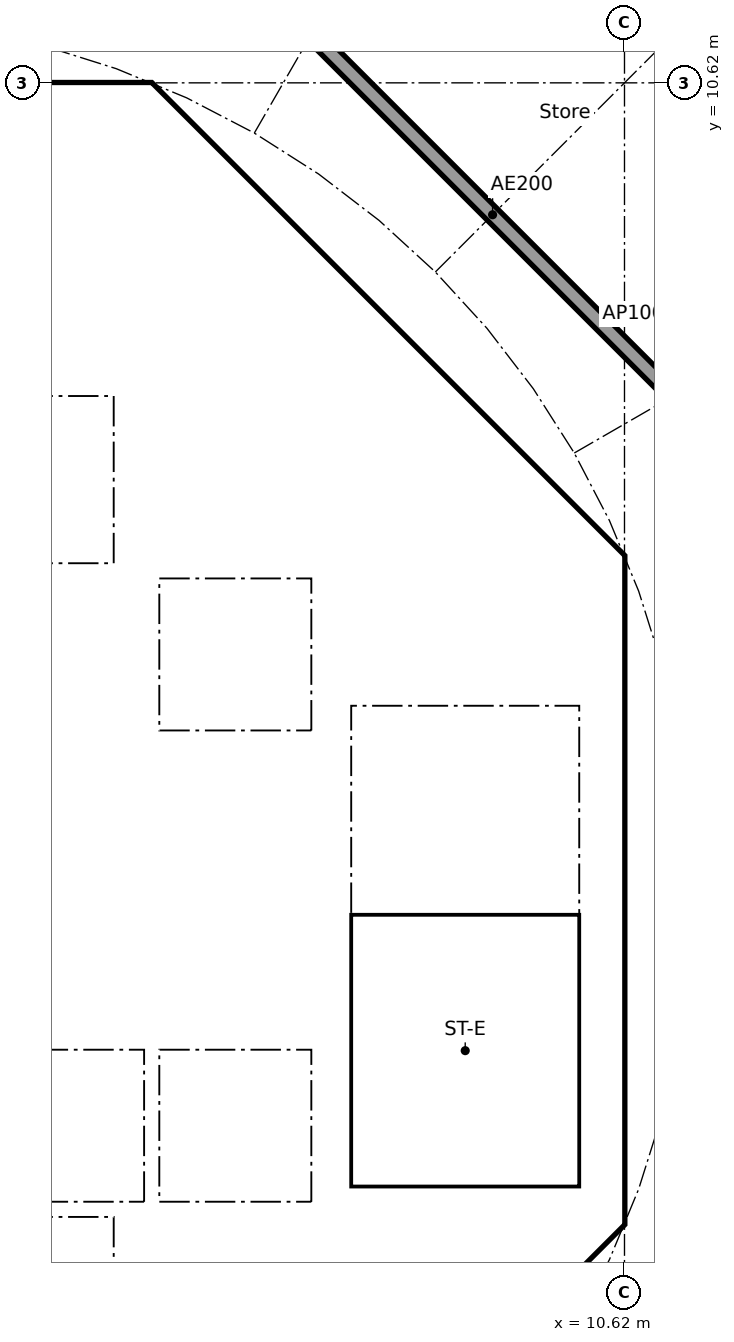
"""IFC4 building model, lengths in metres.
Left out: names, types, materials, properties, quantities, classifications, styles, units other than length and angle.
Written with IfcOpenShell. Run it as: python <this file> out.ifc"""

import sys

from ifc_helpers import new_model, si_unit, direction, frame, frame_2d, origin, place, context, subcontext, project, spatial, polyline, rectangle, outline, extrude, element, fill, save


model = new_model("IFC4")
c1 = context("Model", 3, precision=1e-05, world=origin(), true_north=direction((0.0, 1.0)))
c2 = subcontext(c1, "Body", "Model", "MODEL_VIEW")
j1 = project(units=[si_unit("LENGTHUNIT", "METRE"), si_unit("PLANEANGLEUNIT", "RADIAN")], contexts=[c1])
p1 = place(None, origin())
s1 = spatial("IfcSite", under=j1, at=p1, CompositionType="ELEMENT")
p2 = place(p1, origin())
s2 = spatial("IfcBuilding", under=s1, at=p2, CompositionType="ELEMENT")
p3 = place(p2, frame((0.0, 0.0, 262.2)))
s3 = spatial("IfcBuildingStorey", under=s2, at=p3, CompositionType="ELEMENT", Elevation=262.2)
p4 = place(p3, frame((9.988, 4.613, 0.0), z_axis=(0.0, 0.0, 1.0), x_axis=(-0.707106781187, 0.707106781187, 0.0)))
e1 = element("IfcWall", 1, at=p4, inside=s3, PredefinedType="SHEAR", context=c2, shape_type="SweptSolid", body=[
    extrude(rectangle(XDim=7.602, YDim=0.6, at=frame_2d((3.801, 0.0))), origin(), (0.0, 0.0, 1.0), 3.44),
])
p5 = place(p4, frame((3.201, 0.0, 0.0)))
e2 = element("IfcOpeningElement", 2, at=p5, cuts=e1, PredefinedType="OPENING", context=c2, shape_type="SweptSolid", body=[
    extrude(rectangle(XDim=1.2, YDim=2.1, at=frame_2d((0.6, 1.05))), frame((0.0, 0.31, 0.0), z_axis=(0.0, -1.0, 0.0), x_axis=(1.0, 0.0, 0.0)), (0.0, 0.0, 1.0), 0.62),
])
p6 = place(p3, frame((4.613, -9.988, 0.0), z_axis=(0.0, 0.0, 1.0), x_axis=(0.707106781187, 0.707106781187, 0.0)))
e3 = element("IfcWall", 3, at=p6, inside=s3, PredefinedType="SHEAR", context=c2, shape_type="SweptSolid", body=[
    extrude(rectangle(XDim=7.602, YDim=0.6, at=frame_2d((3.801, 0.0))), origin(), (0.0, 0.0, 1.0), 3.44),
])
p7 = place(p6, frame((3.201, 0.0, 0.0)))
e4 = element("IfcOpeningElement", 4, at=p7, cuts=e3, PredefinedType="OPENING", context=c2, shape_type="SweptSolid", body=[
    extrude(rectangle(XDim=1.2, YDim=2.1, at=frame_2d((0.6, 1.05))), frame((0.0, 0.31, 0.0), z_axis=(0.0, -1.0, 0.0), x_axis=(1.0, 0.0, 0.0)), (0.0, 0.0, 1.0), 0.62),
])
p8 = place(p3, frame((4.0, 4.3, 0.0), z_axis=(0.0, 0.0, 1.0), x_axis=(0.0, 1.0, 0.0)))
e5 = element("IfcWall", 5, at=p8, inside=s3, PredefinedType="SOLIDWALL", context=c2, shape_type="SweptSolid", body=[
    extrude(rectangle(XDim=2.2, YDim=0.2, at=frame_2d((1.1, 0.0))), origin(), (0.0, 0.0, 1.0), 3.44),
])
p9 = place(p8, frame((0.55, 0.0, 0.0)))
e6 = element("IfcOpeningElement", 6, at=p9, cuts=e5, PredefinedType="OPENING", context=c2, shape_type="SweptSolid", body=[
    extrude(rectangle(XDim=1.1, YDim=2.1, at=frame_2d((0.55, 1.05))), frame((0.0, 0.11, 0.0), z_axis=(0.0, -1.0, 0.0), x_axis=(1.0, 0.0, 0.0)), (0.0, 0.0, 1.0), 0.22),
])
p10 = place(p3, frame((-6.7, 2.0, 0.0), z_axis=(0.0, 0.0, 1.0), x_axis=(1.0, 0.0, 0.0)))
e7 = element("IfcWall", 7, at=p10, inside=s3, PredefinedType="SOLIDWALL", context=c2, shape_type="SweptSolid", body=[
    extrude(rectangle(XDim=13.4, YDim=0.2, at=frame_2d((6.7, 0.0))), origin(), (0.0, 0.0, 1.0), 3.44),
])
p11 = place(p10, frame((11.65, 0.0, 0.0)))
e8 = element("IfcOpeningElement", 8, at=p11, cuts=e7, PredefinedType="OPENING", context=c2, shape_type="SweptSolid", body=[
    extrude(rectangle(XDim=1.1, YDim=2.1, at=frame_2d((0.55, 1.05))), frame((0.0, 0.11, 0.0), z_axis=(0.0, -1.0, 0.0), x_axis=(1.0, 0.0, 0.0)), (0.0, 0.0, 1.0), 0.22),
])
p12 = place(p10, frame((2.95, 0.0, 0.0)))
e9 = element("IfcOpeningElement", 9, at=p12, cuts=e7, PredefinedType="OPENING", context=c2, shape_type="SweptSolid", body=[
    extrude(rectangle(XDim=0.9, YDim=2.1, at=frame_2d((0.45, 1.05))), frame((0.0, 0.11, 0.0), z_axis=(0.0, -1.0, 0.0), x_axis=(1.0, 0.0, 0.0)), (0.0, 0.0, 1.0), 0.22),
])
p13 = place(p10, frame((8.45, 0.0, 0.0)))
e10 = element("IfcOpeningElement", 10, at=p13, cuts=e7, PredefinedType="OPENING", context=c2, shape_type="SweptSolid", body=[
    extrude(rectangle(XDim=0.9, YDim=2.1, at=frame_2d((0.45, 1.05))), frame((0.0, 0.11, 0.0), z_axis=(0.0, -1.0, 0.0), x_axis=(1.0, 0.0, 0.0)), (0.0, 0.0, 1.0), 0.22),
])
p14 = place(p3, frame((6.7, 4.0, 0.0), z_axis=(0.0, 0.0, 1.0), x_axis=(1.0, 0.0, 0.0)))
e11 = element("IfcWall", 11, at=p14, inside=s3, PredefinedType="SOLIDWALL", context=c2, shape_type="SweptSolid", body=[
    extrude(rectangle(XDim=3.325, YDim=0.2, at=frame_2d((1.662, 0.0))), origin(), (0.0, 0.0, 1.0), 3.44),
])
p15 = place(p14, frame((1.25, 0.0, 0.0)))
e12 = element("IfcOpeningElement", 12, at=p15, cuts=e11, PredefinedType="OPENING", context=c2, shape_type="SweptSolid", body=[
    extrude(rectangle(XDim=1.1, YDim=2.1, at=frame_2d((0.55, 1.05))), frame((0.0, 0.11, 0.0), z_axis=(0.0, -1.0, 0.0), x_axis=(1.0, 0.0, 0.0)), (0.0, 0.0, 1.0), 0.22),
])
p16 = place(p3, frame((4.0, 7.025, 0.0), z_axis=(0.0, 0.0, 1.0), x_axis=(0.0, 1.0, 0.0)))
e13 = element("IfcWall", 13, at=p16, inside=s3, PredefinedType="SOLIDWALL", context=c2, shape_type="SweptSolid", body=[
    extrude(rectangle(XDim=3.0, YDim=0.2, at=frame_2d((1.5, 0.0))), origin(), (0.0, 0.0, 1.0), 3.44),
])
p17 = place(p16, frame((0.925, 0.0, 0.0)))
e14 = element("IfcOpeningElement", 14, at=p17, cuts=e13, PredefinedType="OPENING", context=c2, shape_type="SweptSolid", body=[
    extrude(rectangle(XDim=1.1, YDim=2.1, at=frame_2d((0.55, 1.05))), frame((0.0, 0.11, 0.0), z_axis=(0.0, -1.0, 0.0), x_axis=(1.0, 0.0, 0.0)), (0.0, 0.0, 1.0), 0.22),
])
p18 = place(p3, frame((4.0, -6.5, 0.0), z_axis=(0.0, 0.0, 1.0), x_axis=(0.0, 1.0, 0.0)))
e15 = element("IfcWall", 15, at=p18, inside=s3, PredefinedType="SOLIDWALL", context=c2, shape_type="SweptSolid", body=[
    extrude(rectangle(XDim=2.2, YDim=0.2, at=frame_2d((1.1, 0.0))), origin(), (0.0, 0.0, 1.0), 3.44),
])
p19 = place(p18, frame((0.55, 0.0, 0.0)))
e16 = element("IfcOpeningElement", 16, at=p19, cuts=e15, PredefinedType="OPENING", context=c2, shape_type="SweptSolid", body=[
    extrude(rectangle(XDim=1.1, YDim=2.1, at=frame_2d((0.55, 1.05))), frame((0.0, 0.11, 0.0), z_axis=(0.0, -1.0, 0.0), x_axis=(1.0, 0.0, 0.0)), (0.0, 0.0, 1.0), 0.22),
])
p20 = place(p3, frame((-6.7, -2.0, 0.0), z_axis=(0.0, 0.0, 1.0), x_axis=(1.0, 0.0, 0.0)))
e17 = element("IfcWall", 17, at=p20, inside=s3, PredefinedType="SOLIDWALL", context=c2, shape_type="SweptSolid", body=[
    extrude(rectangle(XDim=13.4, YDim=0.2, at=frame_2d((6.7, 0.0))), origin(), (0.0, 0.0, 1.0), 3.44),
])
p21 = place(p20, frame((9.45, 0.0, 0.0)))
e18 = element("IfcOpeningElement", 18, at=p21, cuts=e17, PredefinedType="OPENING", context=c2, shape_type="SweptSolid", body=[
    extrude(rectangle(XDim=1.1, YDim=2.1, at=frame_2d((0.55, 1.05))), frame((0.0, 0.11, 0.0), z_axis=(0.0, -1.0, 0.0), x_axis=(1.0, 0.0, 0.0)), (0.0, 0.0, 1.0), 0.22),
])
p22 = place(p20, frame((11.65, 0.0, 0.0)))
e19 = element("IfcOpeningElement", 19, at=p22, cuts=e17, PredefinedType="OPENING", context=c2, shape_type="SweptSolid", body=[
    extrude(rectangle(XDim=1.1, YDim=2.1, at=frame_2d((0.55, 1.05))), frame((0.0, 0.11, 0.0), z_axis=(0.0, -1.0, 0.0), x_axis=(1.0, 0.0, 0.0)), (0.0, 0.0, 1.0), 0.22),
])
p23 = place(p20, frame((1.85, 0.0, 0.0)))
e20 = element("IfcOpeningElement", 20, at=p23, cuts=e17, PredefinedType="OPENING", context=c2, shape_type="SweptSolid", body=[
    extrude(rectangle(XDim=0.9, YDim=2.1, at=frame_2d((0.45, 1.05))), frame((0.0, 0.11, 0.0), z_axis=(0.0, -1.0, 0.0), x_axis=(1.0, 0.0, 0.0)), (0.0, 0.0, 1.0), 0.22),
])
p24 = place(p20, frame((6.25, 0.0, 0.0)))
e21 = element("IfcOpeningElement", 21, at=p24, cuts=e17, PredefinedType="OPENING", context=c2, shape_type="SweptSolid", body=[
    extrude(rectangle(XDim=0.9, YDim=2.1, at=frame_2d((0.45, 1.05))), frame((0.0, 0.11, 0.0), z_axis=(0.0, -1.0, 0.0), x_axis=(1.0, 0.0, 0.0)), (0.0, 0.0, 1.0), 0.22),
])
p25 = place(p3, origin())
e22 = element("IfcWall", 22, at=p25, inside=s3, PredefinedType="SHEAR", context=c2, shape_type="SweptSolid", body=[
    extrude(outline(polyline([(-4.152, 10.025), (-4.401, 9.776), (-4.825, 10.2), (-4.401, 10.625), (4.401, 10.625), (4.825, 10.2), (4.401, 9.776), (4.152, 10.025), (-4.152, 10.025)])), origin(), (0.0, 0.0, 1.0), 3.44),
])
p26 = place(p3, origin())
e23 = element("IfcWall", 23, at=p26, inside=s3, PredefinedType="SHEAR", context=c2, shape_type="SweptSolid", body=[
    extrude(outline(polyline([(9.776, -4.401), (10.025, -4.152), (10.025, -3.801), (10.025, 4.152), (9.776, 4.401), (10.2, 4.825), (10.625, 4.401), (10.625, -4.401), (10.2, -4.825), (9.776, -4.401)])), origin(), (0.0, 0.0, 1.0), 3.44),
])
p27 = place(p3, origin())
e24 = element("IfcWall", 24, at=p27, inside=s3, PredefinedType="SOLIDWALL", context=c2, shape_type="SweptSolid", body=[
    extrude(outline(polyline([(-6.7, -2.1), (-6.5, -2.1), (-6.5, -4.1), (-2.3, -4.1), (-2.3, -2.1), (-2.1, -2.1), (-2.1, -4.1), (2.1, -4.1), (2.1, -2.1), (2.3, -2.1), (2.3, -4.1), (4.3, -4.1), (4.3, -2.1), (4.5, -2.1), (4.5, -4.1), (6.5, -4.1), (6.5, -2.1), (6.7, -2.1), (6.7, -4.3), (-6.7, -4.3), (-6.7, -2.1)])), origin(), (0.0, 0.0, 1.0), 3.44),
])
p28 = place(p3, origin())
e25 = element("IfcWall", 25, at=p28, inside=s3, PredefinedType="SOLIDWALL", context=c2, shape_type="SweptSolid", body=[
    extrude(outline(polyline([(-6.7, 4.3), (6.7, 4.3), (6.7, 2.1), (6.5, 2.1), (6.5, 4.1), (4.5, 4.1), (4.5, 2.1), (4.3, 2.1), (4.3, 4.1), (0.1, 4.1), (0.1, 2.1), (-0.1, 2.1), (-0.1, 4.1), (-6.5, 4.1), (-6.5, 2.1), (-6.7, 2.1), (-6.7, 4.3)])), origin(), (0.0, 0.0, 1.0), 3.44),
])
p29 = place(p3, origin())
e26 = element("IfcWall", 26, at=p29, inside=s3, PredefinedType="SOLIDWALL", context=c2, shape_type="SweptSolid", body=[
    extrude(outline(polyline([(4.1, 6.5), (-4.1, 6.5), (-4.1, 7.025), (4.1, 7.025), (4.1, 6.5)])), origin(), (0.0, 0.0, 1.0), 3.44),
])
p30 = place(p3, origin())
e27 = element("IfcWall", 27, at=p30, inside=s3, PredefinedType="SOLIDWALL", context=c2, shape_type="SweptSolid", body=[
    extrude(outline(polyline([(7.025, -3.9), (6.7, -3.9), (6.7, 3.9), (7.025, 3.9), (7.025, -3.9)])), origin(), (0.0, 0.0, 1.0), 3.44),
])
p31 = place(p3, origin())
e28 = element("IfcWall", 28, at=p31, inside=s3, PredefinedType="SOLIDWALL", context=c2, shape_type="SweptSolid", body=[
    extrude(outline(polyline([(10.025, -4.1), (6.7, -4.1), (6.7, -3.9), (10.025, -3.9), (10.025, -4.1)])), origin(), (0.0, 0.0, 1.0), 3.44),
])
p32 = place(p3, frame((12.635, 5.134, 0.0), z_axis=(0.0, 0.0, 1.0), x_axis=(-0.707106781187, 0.707106781187, 0.0)))
e29 = element("IfcWall", 29, at=p32, inside=s3, PredefinedType="PARTITIONING", context=c2, shape_type="SweptSolid", body=[
    extrude(rectangle(XDim=10.609, YDim=0.2, at=frame_2d((5.305, 0.0))), origin(), (0.0, 0.0, 1.0), 3.44),
])
p33 = place(p3, frame((15.098, 6.427, 0.0), z_axis=(0.0, 0.0, 1.0), x_axis=(-0.637936555536, 0.770088924158, 0.0)))
e30 = element("IfcWall", 30, at=p33, inside=s3, PredefinedType="PARTITIONING", context=c2, shape_type="SweptSolid", body=[
    extrude(rectangle(XDim=6.46, YDim=0.1, at=frame_2d((3.23, 0.0))), origin(), (0.0, 0.0, 1.0), 2.905),
])
p34 = place(p33, frame((2.78, 0.0, 0.0)))
e31 = element("IfcOpeningElement", 31, at=p34, cuts=e30, PredefinedType="OPENING", context=c2, shape_type="SweptSolid", body=[
    extrude(rectangle(XDim=0.9, YDim=2.1, at=frame_2d((0.45, 1.05))), frame((0.0, 0.06, 0.0), z_axis=(0.0, -1.0, 0.0), x_axis=(1.0, 0.0, 0.0)), (0.0, 0.0, 1.0), 0.12),
])
p35 = place(p11, origin())
e32 = element("IfcDoor", 32, at=p35, inside=s3, OperationType="DOUBLE_DOOR_SLIDING", PredefinedType="DOOR", context=c2, shape_type="SweptSolid", body=[
    extrude(rectangle(XDim=1.1, YDim=2.1, at=frame_2d((0.55, 1.05))), frame((0.0, 0.025, 0.0), z_axis=(0.0, -1.0, 0.0), x_axis=(1.0, 0.0, 0.0)), (0.0, 0.0, 1.0), 0.05),
])
fill(e8, e32)
p36 = place(p21, origin())
e33 = element("IfcDoor", 33, at=p36, inside=s3, OperationType="DOUBLE_DOOR_SLIDING", PredefinedType="DOOR", context=c2, shape_type="SweptSolid", body=[
    extrude(rectangle(XDim=1.1, YDim=2.1, at=frame_2d((0.55, 1.05))), frame((0.0, 0.025, 0.0), z_axis=(0.0, -1.0, 0.0), x_axis=(1.0, 0.0, 0.0)), (0.0, 0.0, 1.0), 0.05),
])
fill(e18, e33)
p37 = place(p22, origin())
e34 = element("IfcDoor", 34, at=p37, inside=s3, OperationType="DOUBLE_DOOR_SLIDING", PredefinedType="DOOR", context=c2, shape_type="SweptSolid", body=[
    extrude(rectangle(XDim=1.1, YDim=2.1, at=frame_2d((0.55, 1.05))), frame((0.0, 0.025, 0.0), z_axis=(0.0, -1.0, 0.0), x_axis=(1.0, 0.0, 0.0)), (0.0, 0.0, 1.0), 0.05),
])
fill(e19, e34)
p38 = place(p9, origin())
e35 = element("IfcDoor", 35, at=p38, inside=s3, OperationType="DOUBLE_DOOR_SLIDING", PredefinedType="DOOR", context=c2, shape_type="SweptSolid", body=[
    extrude(rectangle(XDim=1.1, YDim=2.1, at=frame_2d((0.55, 1.05))), frame((0.0, 0.025, 0.0), z_axis=(0.0, -1.0, 0.0), x_axis=(1.0, 0.0, 0.0)), (0.0, 0.0, 1.0), 0.05),
])
fill(e6, e35)
p39 = place(p19, origin())
e36 = element("IfcDoor", 36, at=p39, inside=s3, OperationType="DOUBLE_DOOR_SLIDING", PredefinedType="DOOR", context=c2, shape_type="SweptSolid", body=[
    extrude(rectangle(XDim=1.1, YDim=2.1, at=frame_2d((0.55, 1.05))), frame((0.0, 0.025, 0.0), z_axis=(0.0, -1.0, 0.0), x_axis=(1.0, 0.0, 0.0)), (0.0, 0.0, 1.0), 0.05),
])
fill(e16, e36)
p40 = place(p15, frame((1.1, 0.0, 0.0), x_axis=(-1.0, 0.0, 0.0)))
e37 = element("IfcDoor", 37, at=p40, inside=s3, OperationType="SINGLE_SWING_LEFT", PredefinedType="DOOR", context=c2, shape_type="SweptSolid", body=[
    extrude(rectangle(XDim=1.1, YDim=2.1, at=frame_2d((0.55, 1.05))), frame((0.0, 0.025, 0.0), z_axis=(0.0, -1.0, 0.0), x_axis=(1.0, 0.0, 0.0)), (0.0, 0.0, 1.0), 0.05),
])
fill(e12, e37)
p41 = place(p17, origin())
e38 = element("IfcDoor", 38, at=p41, inside=s3, OperationType="SINGLE_SWING_RIGHT", PredefinedType="DOOR", context=c2, shape_type="SweptSolid", body=[
    extrude(rectangle(XDim=1.1, YDim=2.1, at=frame_2d((0.55, 1.05))), frame((0.0, 0.025, 0.0), z_axis=(0.0, -1.0, 0.0), x_axis=(1.0, 0.0, 0.0)), (0.0, 0.0, 1.0), 0.05),
])
fill(e14, e38)
p42 = place(p5, origin())
e39 = element("IfcDoor", 39, at=p42, inside=s3, OperationType="SINGLE_SWING_RIGHT", PredefinedType="DOOR", context=c2, shape_type="SweptSolid", body=[
    extrude(rectangle(XDim=1.2, YDim=2.1, at=frame_2d((0.6, 1.05))), frame((0.0, 0.025, 0.0), z_axis=(0.0, -1.0, 0.0), x_axis=(1.0, 0.0, 0.0)), (0.0, 0.0, 1.0), 0.05),
])
fill(e2, e39)
save(model, sys.argv[1])
